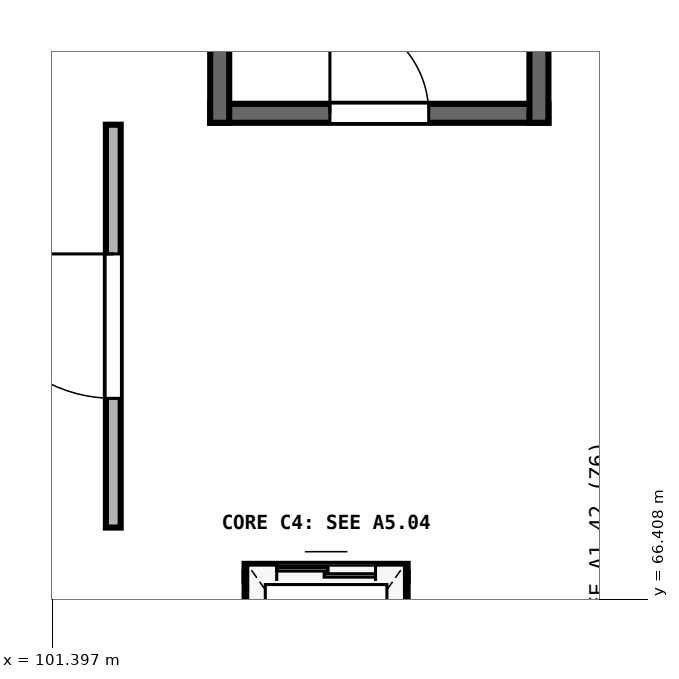
"""IFC4 building model, lengths in metres.
Left out: names, types, materials, properties, quantities, classifications, styles, units other than length and angle.
Written with IfcOpenShell. Run it as: python <this file> out.ifc"""

import sys

from ifc_helpers import new_model, si_unit, direction, frame, frame_2d, origin, place, context, subcontext, project, spatial, rectangle, extrude, element, fill, save


model = new_model("IFC4")
c1 = context("Model", 3, precision=1e-05, world=origin(), true_north=direction((0.0, 1.0)))
c2 = subcontext(c1, "Body", "Model", "MODEL_VIEW")
j1 = project(units=[si_unit("LENGTHUNIT", "METRE"), si_unit("PLANEANGLEUNIT", "RADIAN")], contexts=[c1])
p1 = place(None, origin())
s1 = spatial("IfcSite", under=j1, at=p1, CompositionType="ELEMENT")
p2 = place(p1, origin())
s2 = spatial("IfcBuilding", under=s1, at=p2, CompositionType="ELEMENT")
p3 = place(p2, frame((0.0, 0.0, 14.7)))
s3 = spatial("IfcBuildingStorey", under=s2, at=p3, CompositionType="ELEMENT", Elevation=14.7)
p4 = place(p3, frame((103.475, 72.8, 0.0), z_axis=(0.0, 0.0, 1.0), x_axis=(1.0, 0.0, 0.0)))
e1 = element("IfcWall", 1, at=p4, inside=s3, PredefinedType="SHEAR", context=c2, shape_type="SweptSolid", body=[
    extrude(rectangle(XDim=4.45, YDim=0.25, at=frame_2d((2.225, 0.0))), origin(), (0.0, 0.0, 1.0), 4.25),
])
p5 = place(p4, frame((1.575, 0.0, 0.0)))
e2 = element("IfcOpeningElement", 2, at=p5, cuts=e1, PredefinedType="OPENING", context=c2, shape_type="SweptSolid", body=[
    extrude(rectangle(XDim=1.3, YDim=2.18, at=frame_2d((0.65, 1.09))), frame((0.0, 0.135, 0.0), z_axis=(0.0, -1.0, 0.0), x_axis=(1.0, 0.0, 0.0)), (0.0, 0.0, 1.0), 0.27),
])
for number, where, z_axis, x_axis in (
    (3, (103.6, 72.675, 0.0), (0.0, 0.0, 1.0), (0.0, 1.0, 0.0)),
    (4, (107.8, 72.675, 0.0), (0.0, 0.0, 1.0), (0.0, 1.0, 0.0)),
):
    element("IfcWall", number, at=place(p3, frame(where, z_axis=z_axis, x_axis=x_axis)), inside=s3, PredefinedType="SHEAR", context=c2, shape_type="SweptSolid", body=[
        extrude(rectangle(XDim=11.09, YDim=0.25, at=frame_2d((5.545, 0.0))), origin(), (0.0, 0.0, 1.0), 4.25),
    ])
p6 = place(p3, frame((102.2, 67.35, 0.0), z_axis=(0.0, 0.0, 1.0), x_axis=(0.0, 1.0, 0.0)))
e5 = element("IfcWall", 5, at=p6, inside=s3, PredefinedType="PARTITIONING", context=c2, shape_type="SweptSolid", body=[
    extrude(rectangle(XDim=5.3, YDim=0.195, at=frame_2d((2.65, 0.0))), origin(), (0.0, 0.0, 1.0), 4.2),
])
p7 = place(p6, frame((1.7, 0.0, 0.0)))
e6 = element("IfcOpeningElement", 6, at=p7, cuts=e5, PredefinedType="OPENING", context=c2, shape_type="SweptSolid", body=[
    extrude(rectangle(XDim=1.9, YDim=2.3, at=frame_2d((0.95, 1.15))), frame((0.0, 0.107, 0.0), z_axis=(0.0, -1.0, 0.0), x_axis=(1.0, 0.0, 0.0)), (0.0, 0.0, 1.0), 0.215),
])
p8 = place(p3, frame((103.927, 66.76, 0.0), z_axis=(0.0, 0.0, 1.0), x_axis=(1.0, 0.0, 0.0)))
e7 = element("IfcWall", 7, at=p8, inside=s3, PredefinedType="SOLIDWALL", context=c2, shape_type="SweptSolid", body=[
    extrude(rectangle(XDim=2.145, YDim=0.225, at=frame_2d((1.073, 0.0))), origin(), (0.0, 0.0, 1.0), 4.2),
])
p9 = place(p8, frame((0.423, 0.0, 0.0)))
e8 = element("IfcOpeningElement", 8, at=p9, cuts=e7, PredefinedType="OPENING", context=c2, shape_type="SweptSolid", body=[
    extrude(rectangle(XDim=1.3, YDim=2.25, at=frame_2d((0.65, 1.125))), frame((0.0, 0.123, 0.0), z_axis=(0.0, -1.0, 0.0), x_axis=(1.0, 0.0, 0.0)), (0.0, 0.0, 1.0), 0.245),
])
for number, where, z_axis, x_axis in (
    (9, (104.04, 64.04, 0.0), (0.0, 0.0, 1.0), (0.0, 1.0, 0.0)),
    (10, (105.96, 64.04, 0.0), (0.0, 0.0, 1.0), (0.0, 1.0, 0.0)),
):
    element("IfcWall", number, at=place(p3, frame(where, z_axis=z_axis, x_axis=x_axis)), inside=s3, PredefinedType="SOLIDWALL", context=c2, shape_type="SweptSolid", body=[
        extrude(rectangle(XDim=2.72, YDim=0.225, at=frame_2d((1.36, 0.0))), origin(), (0.0, 0.0, 1.0), 4.2),
    ])
p10 = place(p5, origin())
e11 = element("IfcDoor", 11, at=p10, inside=s3, OperationType="SINGLE_SWING_LEFT", PredefinedType="DOOR", context=c2, shape_type="SweptSolid", body=[
    extrude(rectangle(XDim=1.3, YDim=2.18, at=frame_2d((0.65, 1.09))), frame((0.0, 0.025, 0.0), z_axis=(0.0, -1.0, 0.0), x_axis=(1.0, 0.0, 0.0)), (0.0, 0.0, 1.0), 0.05),
])
fill(e2, e11)
p11 = place(p7, origin())
e12 = element("IfcDoor", 12, at=p11, inside=s3, OperationType="SINGLE_SWING_RIGHT", PredefinedType="DOOR", context=c2, shape_type="SweptSolid", body=[
    extrude(rectangle(XDim=1.9, YDim=2.3, at=frame_2d((0.95, 1.15))), frame((0.0, 0.025, 0.0), z_axis=(0.0, -1.0, 0.0), x_axis=(1.0, 0.0, 0.0)), (0.0, 0.0, 1.0), 0.05),
])
fill(e6, e12)
p12 = place(p9, origin())
e13 = element("IfcDoor", 13, at=p12, inside=s3, OperationType="DOUBLE_DOOR_SLIDING", PredefinedType="DOOR", context=c2, shape_type="SweptSolid", body=[
    extrude(rectangle(XDim=1.3, YDim=2.25, at=frame_2d((0.65, 1.125))), frame((0.0, 0.025, 0.0), z_axis=(0.0, -1.0, 0.0), x_axis=(1.0, 0.0, 0.0)), (0.0, 0.0, 1.0), 0.05),
])
fill(e8, e13)
save(model, sys.argv[1])
